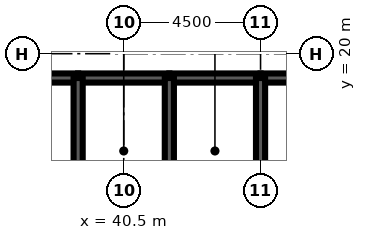
"""IFC4 building model, lengths in metres.
Left out: names, types, materials, properties, quantities, classifications, styles, units other than length and angle.
Written with IfcOpenShell. Run it as: python <this file> out.ifc"""

import sys

from ifc_helpers import new_model, si_unit, direction, frame, frame_2d, origin, place, context, subcontext, project, spatial, rectangle, extrude, element, fill, save


model = new_model("IFC4")
c1 = context("Model", 3, precision=1e-05, world=origin(), true_north=direction((0.0, 1.0)))
c2 = subcontext(c1, "Body", "Model", "MODEL_VIEW")
j1 = project(units=[si_unit("LENGTHUNIT", "METRE"), si_unit("PLANEANGLEUNIT", "RADIAN")], contexts=[c1])
p1 = place(None, origin())
s1 = spatial("IfcSite", under=j1, at=p1, CompositionType="ELEMENT")
p2 = place(p1, origin())
s2 = spatial("IfcBuilding", under=s1, at=p2, CompositionType="ELEMENT")
p3 = place(p2, frame((0.0, 0.0, 244.6)))
s3 = spatial("IfcBuildingStorey", under=s2, at=p3, CompositionType="ELEMENT", Elevation=244.6)
p4 = place(p3, frame((36.0, 19.2, 0.0), z_axis=(0.0, 0.0, 1.0), x_axis=(1.0, 0.0, 0.0)))
e1 = element("IfcWall", 1, at=p4, inside=s3, PredefinedType="SOLIDWALL", context=c2, shape_type="SweptSolid", body=[
    extrude(rectangle(XDim=3.0, YDim=0.3, at=frame_2d((1.5, 0.0))), origin(), (0.0, 0.0, 1.0), 4.2),
])
p5 = place(p4, frame((0.95, 0.0, 0.0)))
e2 = element("IfcOpeningElement", 2, at=p5, cuts=e1, PredefinedType="OPENING", context=c2, shape_type="SweptSolid", body=[
    extrude(rectangle(XDim=1.1, YDim=2.2, at=frame_2d((0.55, 1.1))), frame((0.0, 0.16, 0.0), z_axis=(0.0, -1.0, 0.0), x_axis=(1.0, 0.0, 0.0)), (0.0, 0.0, 1.0), 0.32),
])
p6 = place(p3, frame((39.0, 19.2, 0.0), z_axis=(0.0, 0.0, 1.0), x_axis=(1.0, 0.0, 0.0)))
e3 = element("IfcWall", 3, at=p6, inside=s3, PredefinedType="SOLIDWALL", context=c2, shape_type="SweptSolid", body=[
    extrude(rectangle(XDim=3.0, YDim=0.3, at=frame_2d((1.5, 0.0))), origin(), (0.0, 0.0, 1.0), 4.2),
])
p7 = place(p6, frame((1.0, 0.0, 0.0)))
e4 = element("IfcOpeningElement", 4, at=p7, cuts=e3, PredefinedType="OPENING", context=c2, shape_type="SweptSolid", body=[
    extrude(rectangle(XDim=1.0, YDim=2.1, at=frame_2d((0.5, 1.05))), frame((0.0, 0.16, 0.0), z_axis=(0.0, -1.0, 0.0), x_axis=(1.0, 0.0, 0.0)), (0.0, 0.0, 1.0), 0.32),
])
p8 = place(p3, frame((42.0, 19.2, 0.0), z_axis=(0.0, 0.0, 1.0), x_axis=(1.0, 0.0, 0.0)))
e5 = element("IfcWall", 5, at=p8, inside=s3, PredefinedType="SOLIDWALL", context=c2, shape_type="SweptSolid", body=[
    extrude(rectangle(XDim=3.0, YDim=0.3, at=frame_2d((1.5, 0.0))), origin(), (0.0, 0.0, 1.0), 4.2),
])
p9 = place(p8, frame((1.0, 0.0, 0.0)))
e6 = element("IfcOpeningElement", 6, at=p9, cuts=e5, PredefinedType="OPENING", context=c2, shape_type="SweptSolid", body=[
    extrude(rectangle(XDim=1.0, YDim=2.1, at=frame_2d((0.5, 1.05))), frame((0.0, 0.16, 0.0), z_axis=(0.0, -1.0, 0.0), x_axis=(1.0, 0.0, 0.0)), (0.0, 0.0, 1.0), 0.32),
])
p10 = place(p3, frame((45.0, 19.2, 0.0), z_axis=(0.0, 0.0, 1.0), x_axis=(1.0, 0.0, 0.0)))
e7 = element("IfcWall", 7, at=p10, inside=s3, PredefinedType="SOLIDWALL", context=c2, shape_type="SweptSolid", body=[
    extrude(rectangle(XDim=9.0, YDim=0.3, at=frame_2d((4.5, 0.0))), origin(), (0.0, 0.0, 1.0), 4.2),
])
p11 = place(p10, frame((7.35, 0.0, 0.0)))
e8 = element("IfcOpeningElement", 8, at=p11, cuts=e7, PredefinedType="OPENING", context=c2, shape_type="SweptSolid", body=[
    extrude(rectangle(XDim=1.0, YDim=2.1, at=frame_2d((0.5, 1.05))), frame((0.0, 0.16, 0.0), z_axis=(0.0, -1.0, 0.0), x_axis=(1.0, 0.0, 0.0)), (0.0, 0.0, 1.0), 0.32),
])
for number, where, z_axis, x_axis in (
    (9, (39.0, 16.0, 0.0), (0.0, 0.0, 1.0), (0.0, 1.0, 0.0)),
    (10, (42.0, 16.0, 0.0), (0.0, 0.0, 1.0), (0.0, 1.0, 0.0)),
    (11, (45.0, 16.0, 0.0), (0.0, 0.0, 1.0), (0.0, 1.0, 0.0)),
):
    element("IfcWall", number, at=place(p3, frame(where, z_axis=z_axis, x_axis=x_axis)), inside=s3, PredefinedType="SOLIDWALL", context=c2, shape_type="SweptSolid", body=[
        extrude(rectangle(XDim=3.2, YDim=0.3, at=frame_2d((1.6, 0.0))), origin(), (0.0, 0.0, 1.0), 4.2),
    ])
p12 = place(p3, frame((39.15, 17.35, 0.0), z_axis=(0.0, 0.0, 1.0), x_axis=(1.0, 0.0, 0.0)))
e12 = element("IfcWall", 12, at=p12, inside=s3, PredefinedType="SOLIDWALL", context=c2, shape_type="SweptSolid", body=[
    extrude(rectangle(XDim=2.7, YDim=0.3, at=frame_2d((1.35, 0.0))), origin(), (0.0, 0.0, 1.0), 4.04),
])
p13 = place(p12, frame((0.85, 0.0, 0.0)))
e13 = element("IfcOpeningElement", 13, at=p13, cuts=e12, PredefinedType="OPENING", context=c2, shape_type="SweptSolid", body=[
    extrude(rectangle(XDim=1.0, YDim=2.1, at=frame_2d((0.5, 1.05))), frame((0.0, 0.16, 0.0), z_axis=(0.0, -1.0, 0.0), x_axis=(1.0, 0.0, 0.0)), (0.0, 0.0, 1.0), 0.32),
])
p14 = place(p3, frame((42.15, 17.35, 0.0), z_axis=(0.0, 0.0, 1.0), x_axis=(1.0, 0.0, 0.0)))
e14 = element("IfcWall", 14, at=p14, inside=s3, PredefinedType="SOLIDWALL", context=c2, shape_type="SweptSolid", body=[
    extrude(rectangle(XDim=2.7, YDim=0.3, at=frame_2d((1.35, 0.0))), origin(), (0.0, 0.0, 1.0), 4.04),
])
p15 = place(p14, frame((0.85, 0.0, 0.0)))
e15 = element("IfcOpeningElement", 15, at=p15, cuts=e14, PredefinedType="OPENING", context=c2, shape_type="SweptSolid", body=[
    extrude(rectangle(XDim=1.0, YDim=2.1, at=frame_2d((0.5, 1.05))), frame((0.0, 0.16, 0.0), z_axis=(0.0, -1.0, 0.0), x_axis=(1.0, 0.0, 0.0)), (0.0, 0.0, 1.0), 0.32),
])
p16 = place(p13, origin())
e16 = element("IfcDoor", 16, at=p16, inside=s3, OperationType="SINGLE_SWING_LEFT", PredefinedType="DOOR", context=c2, shape_type="SweptSolid", body=[
    extrude(rectangle(XDim=1.0, YDim=2.1, at=frame_2d((0.5, 1.05))), frame((0.0, 0.025, 0.0), z_axis=(0.0, -1.0, 0.0), x_axis=(1.0, 0.0, 0.0)), (0.0, 0.0, 1.0), 0.05),
])
fill(e13, e16)
p17 = place(p15, origin())
e17 = element("IfcDoor", 17, at=p17, inside=s3, OperationType="SINGLE_SWING_LEFT", PredefinedType="DOOR", context=c2, shape_type="SweptSolid", body=[
    extrude(rectangle(XDim=1.0, YDim=2.1, at=frame_2d((0.5, 1.05))), frame((0.0, 0.025, 0.0), z_axis=(0.0, -1.0, 0.0), x_axis=(1.0, 0.0, 0.0)), (0.0, 0.0, 1.0), 0.05),
])
fill(e15, e17)
p18 = place(p7, origin())
e18 = element("IfcDoor", 18, at=p18, inside=s3, OperationType="SINGLE_SWING_LEFT", PredefinedType="DOOR", context=c2, shape_type="SweptSolid", body=[
    extrude(rectangle(XDim=1.0, YDim=2.1, at=frame_2d((0.5, 1.05))), frame((0.0, 0.025, 0.0), z_axis=(0.0, -1.0, 0.0), x_axis=(1.0, 0.0, 0.0)), (0.0, 0.0, 1.0), 0.05),
])
fill(e4, e18)
p19 = place(p9, origin())
e19 = element("IfcDoor", 19, at=p19, inside=s3, OperationType="SINGLE_SWING_LEFT", PredefinedType="DOOR", context=c2, shape_type="SweptSolid", body=[
    extrude(rectangle(XDim=1.0, YDim=2.1, at=frame_2d((0.5, 1.05))), frame((0.0, 0.025, 0.0), z_axis=(0.0, -1.0, 0.0), x_axis=(1.0, 0.0, 0.0)), (0.0, 0.0, 1.0), 0.05),
])
fill(e6, e19)
save(model, sys.argv[1])
